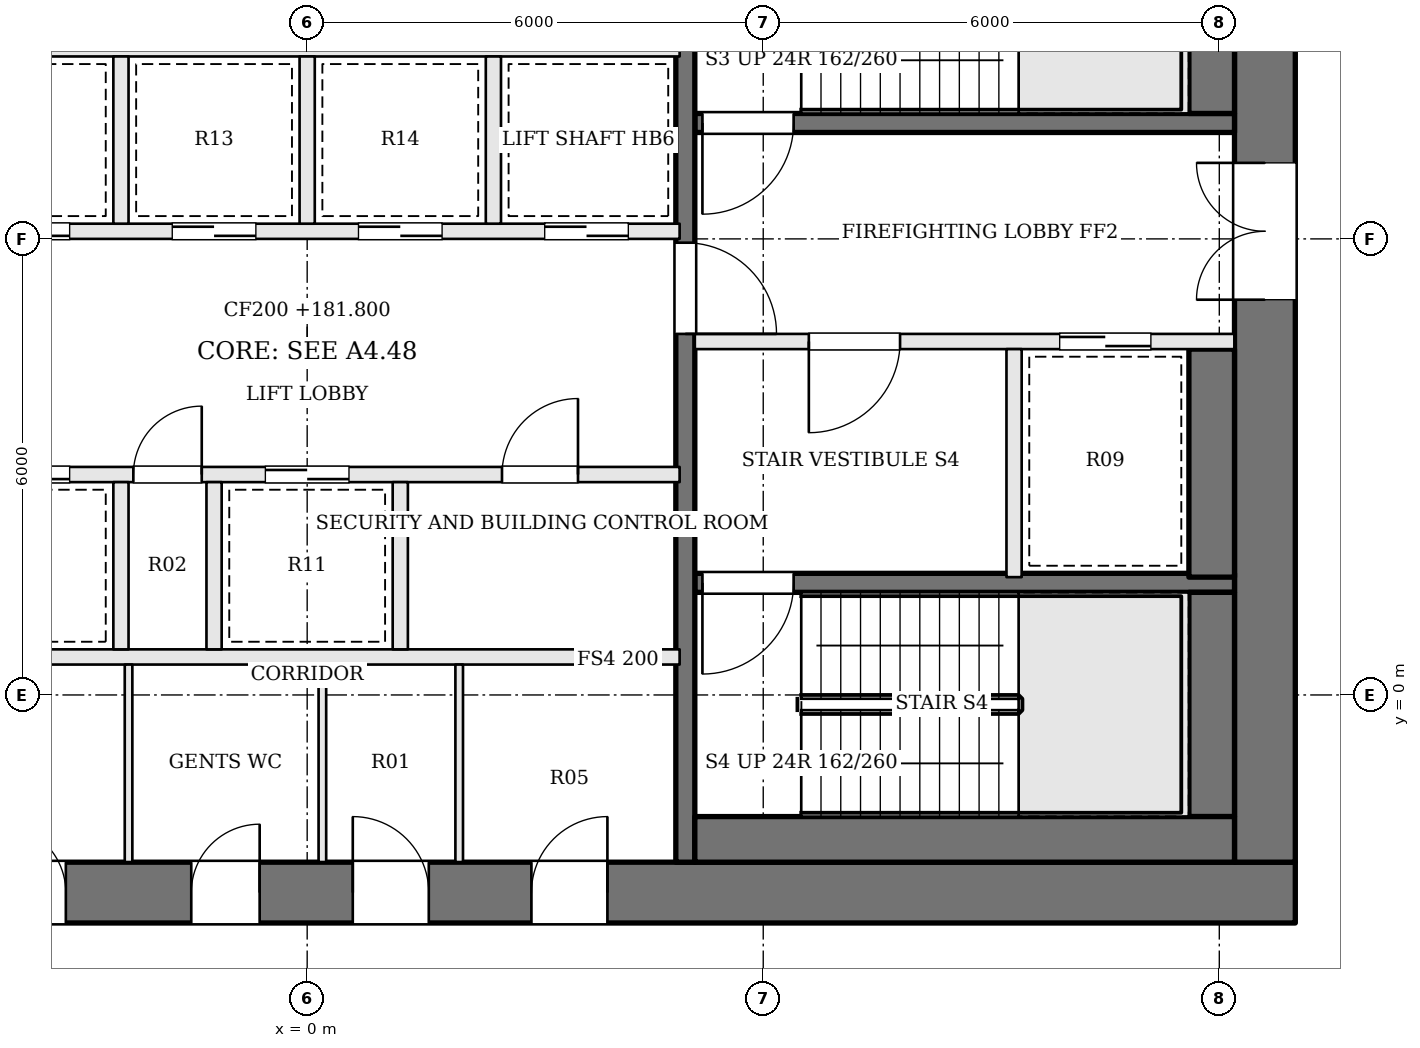
"""IFC4 building model, lengths in metres.
Left out: names, types, materials, properties, quantities, classifications, styles, units other than length and angle.
Written with IfcOpenShell. Run it as: python <this file> out.ifc"""

import sys

from ifc_helpers import new_model, si_unit, direction, frame, frame_2d, origin, place, context, subcontext, project, spatial, rectangle, extrude, element, fill, save


model = new_model("IFC4")
c1 = context("Model", 3, precision=1e-05, world=origin(), true_north=direction((0.0, 1.0)))
c2 = subcontext(c1, "Body", "Model", "MODEL_VIEW")
j1 = project(units=[si_unit("LENGTHUNIT", "METRE"), si_unit("PLANEANGLEUNIT", "RADIAN")], contexts=[c1])
p1 = place(None, origin())
s1 = spatial("IfcSite", under=j1, at=p1, CompositionType="ELEMENT")
p2 = place(p1, origin())
s2 = spatial("IfcBuilding", under=s1, at=p2, CompositionType="ELEMENT")
p3 = place(p2, frame((0.0, 0.0, 181.8)))
s3 = spatial("IfcBuildingStorey", under=s2, at=p3, CompositionType="ELEMENT", Elevation=181.8)
p4 = place(p3, frame((-13.0, -2.6, 0.0), z_axis=(0.0, 0.0, 1.0), x_axis=(1.0, 0.0, 0.0)))
e1 = element("IfcWall", 1, at=p4, inside=s3, PredefinedType="SHEAR", context=c2, shape_type="SweptSolid", body=[
    extrude(rectangle(XDim=26.0, YDim=0.8, at=frame_2d((13.0, 0.0))), origin(), (0.0, 0.0, 1.0), 3.9),
])
p5 = place(p4, frame((8.925, 0.0, 0.0)))
e2 = element("IfcOpeningElement", 2, at=p5, cuts=e1, PredefinedType="OPENING", context=c2, shape_type="SweptSolid", body=[
    extrude(rectangle(XDim=0.9, YDim=2.1, at=frame_2d((0.45, 1.05))), frame((0.0, 0.41, 0.0), z_axis=(0.0, -1.0, 0.0), x_axis=(1.0, 0.0, 0.0)), (0.0, 0.0, 1.0), 0.82),
])
p6 = place(p4, frame((11.475, 0.0, 0.0)))
e3 = element("IfcOpeningElement", 3, at=p6, cuts=e1, PredefinedType="OPENING", context=c2, shape_type="SweptSolid", body=[
    extrude(rectangle(XDim=0.9, YDim=2.1, at=frame_2d((0.45, 1.05))), frame((0.0, 0.41, 0.0), z_axis=(0.0, -1.0, 0.0), x_axis=(1.0, 0.0, 0.0)), (0.0, 0.0, 1.0), 0.82),
])
p7 = place(p4, frame((13.6, 0.0, 0.0)))
e4 = element("IfcOpeningElement", 4, at=p7, cuts=e1, PredefinedType="OPENING", context=c2, shape_type="SweptSolid", body=[
    extrude(rectangle(XDim=1.0, YDim=2.1, at=frame_2d((0.5, 1.05))), frame((0.0, 0.41, 0.0), z_axis=(0.0, -1.0, 0.0), x_axis=(1.0, 0.0, 0.0)), (0.0, 0.0, 1.0), 0.82),
])
p8 = place(p4, frame((15.95, 0.0, 0.0)))
e5 = element("IfcOpeningElement", 5, at=p8, cuts=e1, PredefinedType="OPENING", context=c2, shape_type="SweptSolid", body=[
    extrude(rectangle(XDim=1.0, YDim=2.1, at=frame_2d((0.5, 1.05))), frame((0.0, 0.41, 0.0), z_axis=(0.0, -1.0, 0.0), x_axis=(1.0, 0.0, 0.0)), (0.0, 0.0, 1.0), 0.82),
])
p9 = place(p3, frame((12.6, -2.2, 0.0), z_axis=(0.0, 0.0, 1.0), x_axis=(0.0, 1.0, 0.0)))
e6 = element("IfcWall", 6, at=p9, inside=s3, PredefinedType="SHEAR", context=c2, shape_type="SweptSolid", body=[
    extrude(rectangle(XDim=13.4, YDim=0.8, at=frame_2d((6.7, 0.0))), origin(), (0.0, 0.0, 1.0), 3.9),
])
p10 = place(p9, frame((7.4, 0.0, 0.0)))
e7 = element("IfcOpeningElement", 7, at=p10, cuts=e6, PredefinedType="OPENING", context=c2, shape_type="SweptSolid", body=[
    extrude(rectangle(XDim=1.8, YDim=2.1, at=frame_2d((0.9, 1.05))), frame((0.0, 0.41, 0.0), z_axis=(0.0, -1.0, 0.0), x_axis=(1.0, 0.0, 0.0)), (0.0, 0.0, 1.0), 0.82),
])
p11 = place(p3, frame((12.2, 7.525, 0.0), z_axis=(0.0, 0.0, 1.0), x_axis=(-1.0, 0.0, 0.0)))
e8 = element("IfcWall", 8, at=p11, inside=s3, PredefinedType="SOLIDWALL", context=c2, shape_type="SweptSolid", body=[
    extrude(rectangle(XDim=7.1, YDim=0.25, at=frame_2d((3.55, 0.0))), origin(), (0.0, 0.0, 1.0), 3.7),
])
p12 = place(p11, frame((5.8, 0.0, 0.0)))
e9 = element("IfcOpeningElement", 9, at=p12, cuts=e8, PredefinedType="OPENING", context=c2, shape_type="SweptSolid", body=[
    extrude(rectangle(XDim=1.2, YDim=2.1, at=frame_2d((0.6, 1.05))), frame((0.0, 0.135, 0.0), z_axis=(0.0, -1.0, 0.0), x_axis=(1.0, 0.0, 0.0)), (0.0, 0.0, 1.0), 0.27),
])
p13 = place(p3, frame((12.2, 4.65, 0.0), z_axis=(0.0, 0.0, 1.0), x_axis=(-1.0, 0.0, 0.0)))
e10 = element("IfcWall", 10, at=p13, inside=s3, PredefinedType="SOLIDWALL", context=c2, shape_type="SweptSolid", body=[
    extrude(rectangle(XDim=7.1, YDim=0.2, at=frame_2d((3.55, 0.0))), origin(), (0.0, 0.0, 1.0), 3.7),
])
p14 = place(p13, frame((4.4, 0.0, 0.0)))
e11 = element("IfcOpeningElement", 11, at=p14, cuts=e10, PredefinedType="OPENING", context=c2, shape_type="SweptSolid", body=[
    extrude(rectangle(XDim=1.2, YDim=2.1, at=frame_2d((0.6, 1.05))), frame((0.0, 0.11, 0.0), z_axis=(0.0, -1.0, 0.0), x_axis=(1.0, 0.0, 0.0)), (0.0, 0.0, 1.0), 0.22),
])
p15 = place(p13, frame((1.1, 0.0, 0.0)))
e12 = element("IfcOpeningElement", 12, at=p15, cuts=e10, PredefinedType="OPENING", context=c2, shape_type="SweptSolid", body=[
    extrude(rectangle(XDim=1.2, YDim=2.1, at=frame_2d((0.6, 1.05))), frame((0.0, 0.11, 0.0), z_axis=(0.0, -1.0, 0.0), x_axis=(1.0, 0.0, 0.0)), (0.0, 0.0, 1.0), 0.22),
])
p16 = place(p3, frame((12.2, 1.475, 0.0), z_axis=(0.0, 0.0, 1.0), x_axis=(-1.0, 0.0, 0.0)))
e13 = element("IfcWall", 13, at=p16, inside=s3, PredefinedType="SOLIDWALL", context=c2, shape_type="SweptSolid", body=[
    extrude(rectangle(XDim=7.1, YDim=0.25, at=frame_2d((3.55, 0.0))), origin(), (0.0, 0.0, 1.0), 3.7),
])
p17 = place(p16, frame((5.8, 0.0, 0.0)))
e14 = element("IfcOpeningElement", 14, at=p17, cuts=e13, PredefinedType="OPENING", context=c2, shape_type="SweptSolid", body=[
    extrude(rectangle(XDim=1.2, YDim=2.1, at=frame_2d((0.6, 1.05))), frame((0.0, 0.135, 0.0), z_axis=(0.0, -1.0, 0.0), x_axis=(1.0, 0.0, 0.0)), (0.0, 0.0, 1.0), 0.27),
])
p18 = place(p3, frame((9.3, 4.55, 0.0), z_axis=(0.0, 0.0, 1.0), x_axis=(0.0, -1.0, 0.0)))
e15 = element("IfcWall", 15, at=p18, inside=s3, PredefinedType="SOLIDWALL", context=c2, shape_type="SweptSolid", body=[
    extrude(rectangle(XDim=3.0, YDim=0.2, at=frame_2d((1.5, 0.0))), origin(), (0.0, 0.0, 1.0), 3.7),
])
p19 = place(p3, frame((4.975, 11.2, 0.0), z_axis=(0.0, 0.0, 1.0), x_axis=(0.0, -1.0, 0.0)))
e16 = element("IfcWall", 16, at=p19, inside=s3, PredefinedType="SOLIDWALL", context=c2, shape_type="SweptSolid", body=[
    extrude(rectangle(XDim=13.4, YDim=0.25, at=frame_2d((6.7, 0.0))), origin(), (0.0, 0.0, 1.0), 3.7),
])
p20 = place(p19, frame((5.25, 0.0, 0.0)))
e17 = element("IfcOpeningElement", 17, at=p20, cuts=e16, PredefinedType="OPENING", context=c2, shape_type="SweptSolid", body=[
    extrude(rectangle(XDim=1.2, YDim=2.1, at=frame_2d((0.6, 1.05))), frame((0.0, 0.135, 0.0), z_axis=(0.0, -1.0, 0.0), x_axis=(1.0, 0.0, 0.0)), (0.0, 0.0, 1.0), 0.27),
])
p21 = place(p3, frame((11.9, 10.6, 0.0), z_axis=(0.0, 0.0, 1.0), x_axis=(0.0, -1.0, 0.0)))
e18 = element("IfcWall", 18, at=p21, inside=s3, PredefinedType="SOLIDWALL", context=c2, shape_type="SweptSolid", body=[
    extrude(rectangle(XDim=2.95, YDim=0.6, at=frame_2d((1.475, 0.0))), origin(), (0.0, 0.0, 1.0), 3.7),
])
p22 = place(p3, frame((11.9, 4.55, 0.0), z_axis=(0.0, 0.0, 1.0), x_axis=(0.0, -1.0, 0.0)))
e19 = element("IfcWall", 19, at=p22, inside=s3, PredefinedType="SOLIDWALL", context=c2, shape_type="SweptSolid", body=[
    extrude(rectangle(XDim=3.0, YDim=0.6, at=frame_2d((1.5, 0.0))), origin(), (0.0, 0.0, 1.0), 3.7),
])
p23 = place(p3, frame((11.9, 1.35, 0.0), z_axis=(0.0, 0.0, 1.0), x_axis=(0.0, -1.0, 0.0)))
e20 = element("IfcWall", 20, at=p23, inside=s3, PredefinedType="SOLIDWALL", context=c2, shape_type="SweptSolid", body=[
    extrude(rectangle(XDim=2.95, YDim=0.6, at=frame_2d((1.475, 0.0))), origin(), (0.0, 0.0, 1.0), 3.7),
])
p24 = place(p3, frame((12.2, -1.9, 0.0), z_axis=(0.0, 0.0, 1.0), x_axis=(-1.0, 0.0, 0.0)))
e21 = element("IfcWall", 21, at=p24, inside=s3, PredefinedType="SOLIDWALL", context=c2, shape_type="SweptSolid", body=[
    extrude(rectangle(XDim=7.1, YDim=0.6, at=frame_2d((3.55, 0.0))), origin(), (0.0, 0.0, 1.0), 3.7),
])
p25 = place(p3, frame((-4.9, 0.5, 0.0), z_axis=(0.0, 0.0, 1.0), x_axis=(1.0, 0.0, 0.0)))
e22 = element("IfcWall", 22, at=p25, inside=s3, PredefinedType="SOLIDWALL", context=c2, shape_type="SweptSolid", body=[
    extrude(rectangle(XDim=9.8, YDim=0.2, at=frame_2d((4.9, 0.0))), origin(), (0.0, 0.0, 1.0), 3.7),
])
p26 = place(p3, frame((-4.9, 2.9, 0.0), z_axis=(0.0, 0.0, 1.0), x_axis=(1.0, 0.0, 0.0)))
e23 = element("IfcWall", 23, at=p26, inside=s3, PredefinedType="SOLIDWALL", context=c2, shape_type="SweptSolid", body=[
    extrude(rectangle(XDim=9.8, YDim=0.2, at=frame_2d((4.9, 0.0))), origin(), (0.0, 0.0, 1.0), 3.7),
])
p27 = place(p26, frame((0.675, 0.0, 0.0)))
e24 = element("IfcOpeningElement", 24, at=p27, cuts=e23, PredefinedType="OPENING", context=c2, shape_type="SweptSolid", body=[
    extrude(rectangle(XDim=1.1, YDim=2.1, at=frame_2d((0.55, 1.05))), frame((0.0, 0.11, 0.0), z_axis=(0.0, -1.0, 0.0), x_axis=(1.0, 0.0, 0.0)), (0.0, 0.0, 1.0), 0.22),
])
p28 = place(p26, frame((2.613, 0.0, 0.0)))
e25 = element("IfcOpeningElement", 25, at=p28, cuts=e23, PredefinedType="OPENING", context=c2, shape_type="SweptSolid", body=[
    extrude(rectangle(XDim=0.9, YDim=2.1, at=frame_2d((0.45, 1.05))), frame((0.0, 0.11, 0.0), z_axis=(0.0, -1.0, 0.0), x_axis=(1.0, 0.0, 0.0)), (0.0, 0.0, 1.0), 0.22),
])
p29 = place(p26, frame((4.35, 0.0, 0.0)))
e26 = element("IfcOpeningElement", 26, at=p29, cuts=e23, PredefinedType="OPENING", context=c2, shape_type="SweptSolid", body=[
    extrude(rectangle(XDim=1.1, YDim=2.1, at=frame_2d((0.55, 1.05))), frame((0.0, 0.11, 0.0), z_axis=(0.0, -1.0, 0.0), x_axis=(1.0, 0.0, 0.0)), (0.0, 0.0, 1.0), 0.22),
])
p30 = place(p26, frame((7.463, 0.0, 0.0)))
e27 = element("IfcOpeningElement", 27, at=p30, cuts=e23, PredefinedType="OPENING", context=c2, shape_type="SweptSolid", body=[
    extrude(rectangle(XDim=1.0, YDim=2.1, at=frame_2d((0.5, 1.05))), frame((0.0, 0.11, 0.0), z_axis=(0.0, -1.0, 0.0), x_axis=(1.0, 0.0, 0.0)), (0.0, 0.0, 1.0), 0.22),
])
p31 = place(p3, frame((-4.9, 6.1, 0.0), z_axis=(0.0, 0.0, 1.0), x_axis=(1.0, 0.0, 0.0)))
e28 = element("IfcWall", 28, at=p31, inside=s3, PredefinedType="SOLIDWALL", context=c2, shape_type="SweptSolid", body=[
    extrude(rectangle(XDim=9.8, YDim=0.2, at=frame_2d((4.9, 0.0))), origin(), (0.0, 0.0, 1.0), 3.7),
])
p32 = place(p31, frame((0.675, 0.0, 0.0)))
e29 = element("IfcOpeningElement", 29, at=p32, cuts=e28, PredefinedType="OPENING", context=c2, shape_type="SweptSolid", body=[
    extrude(rectangle(XDim=1.1, YDim=2.1, at=frame_2d((0.55, 1.05))), frame((0.0, 0.11, 0.0), z_axis=(0.0, -1.0, 0.0), x_axis=(1.0, 0.0, 0.0)), (0.0, 0.0, 1.0), 0.22),
])
p33 = place(p31, frame((3.125, 0.0, 0.0)))
e30 = element("IfcOpeningElement", 30, at=p33, cuts=e28, PredefinedType="OPENING", context=c2, shape_type="SweptSolid", body=[
    extrude(rectangle(XDim=1.1, YDim=2.1, at=frame_2d((0.55, 1.05))), frame((0.0, 0.11, 0.0), z_axis=(0.0, -1.0, 0.0), x_axis=(1.0, 0.0, 0.0)), (0.0, 0.0, 1.0), 0.22),
])
p34 = place(p31, frame((5.575, 0.0, 0.0)))
e31 = element("IfcOpeningElement", 31, at=p34, cuts=e28, PredefinedType="OPENING", context=c2, shape_type="SweptSolid", body=[
    extrude(rectangle(XDim=1.1, YDim=2.1, at=frame_2d((0.55, 1.05))), frame((0.0, 0.11, 0.0), z_axis=(0.0, -1.0, 0.0), x_axis=(1.0, 0.0, 0.0)), (0.0, 0.0, 1.0), 0.22),
])
p35 = place(p31, frame((8.025, 0.0, 0.0)))
e32 = element("IfcOpeningElement", 32, at=p35, cuts=e28, PredefinedType="OPENING", context=c2, shape_type="SweptSolid", body=[
    extrude(rectangle(XDim=1.1, YDim=2.1, at=frame_2d((0.55, 1.05))), frame((0.0, 0.11, 0.0), z_axis=(0.0, -1.0, 0.0), x_axis=(1.0, 0.0, 0.0)), (0.0, 0.0, 1.0), 0.22),
])
p36 = place(p3, frame((-4.9, 8.5, 0.0), z_axis=(0.0, 0.0, 1.0), x_axis=(1.0, 0.0, 0.0)))
e33 = element("IfcWall", 33, at=p36, inside=s3, PredefinedType="SOLIDWALL", context=c2, shape_type="SweptSolid", body=[
    extrude(rectangle(XDim=9.8, YDim=0.2, at=frame_2d((4.9, 0.0))), origin(), (0.0, 0.0, 1.0), 3.7),
])
for number, where, z_axis, x_axis in (
    (34, (-2.45, 0.6, 0.0), (0.0, 0.0, 1.0), (0.0, 1.0, 0.0)),
    (35, (-1.225, 0.6, 0.0), (0.0, 0.0, 1.0), (0.0, 1.0, 0.0)),
    (36, (1.225, 0.6, 0.0), (0.0, 0.0, 1.0), (0.0, 1.0, 0.0)),
    (37, (-2.45, 6.2, 0.0), (0.0, 0.0, 1.0), (0.0, 1.0, 0.0)),
    (38, (0.0, 6.2, 0.0), (0.0, 0.0, 1.0), (0.0, 1.0, 0.0)),
    (39, (2.45, 6.2, 0.0), (0.0, 0.0, 1.0), (0.0, 1.0, 0.0)),
):
    element("IfcWall", number, at=place(p3, frame(where, z_axis=z_axis, x_axis=x_axis)), inside=s3, PredefinedType="SOLIDWALL", context=c2, shape_type="SweptSolid", body=[
        extrude(rectangle(XDim=2.2, YDim=0.2, at=frame_2d((1.1, 0.0))), origin(), (0.0, 0.0, 1.0), 3.7),
    ])
for number, where, z_axis, x_axis in (
    (40, (-2.35, -2.2, 0.0), (0.0, 0.0, 1.0), (0.0, 1.0, 0.0)),
    (41, (0.2, -2.2, 0.0), (0.0, 0.0, 1.0), (0.0, 1.0, 0.0)),
    (42, (2.0, -2.2, 0.0), (0.0, 0.0, 1.0), (0.0, 1.0, 0.0)),
):
    element("IfcWall", number, at=place(p3, frame(where, z_axis=z_axis, x_axis=x_axis)), inside=s3, PredefinedType="PARTITIONING", context=c2, shape_type="SweptSolid", body=[
        extrude(rectangle(XDim=2.6, YDim=0.1, at=frame_2d((1.3, 0.0))), origin(), (0.0, 0.0, 1.0), 3.7),
    ])
p37 = place(p10, origin())
e43 = element("IfcDoor", 43, at=p37, inside=s3, OperationType="DOUBLE_DOOR_SINGLE_SWING", PredefinedType="DOOR", context=c2, shape_type="SweptSolid", body=[
    extrude(rectangle(XDim=1.8, YDim=2.1, at=frame_2d((0.9, 1.05))), frame((0.0, 0.025, 0.0), z_axis=(0.0, -1.0, 0.0), x_axis=(1.0, 0.0, 0.0)), (0.0, 0.0, 1.0), 0.05),
])
fill(e7, e43)
p38 = place(p20, origin())
e44 = element("IfcDoor", 44, at=p38, inside=s3, OperationType="SINGLE_SWING_RIGHT", PredefinedType="DOOR", context=c2, shape_type="SweptSolid", body=[
    extrude(rectangle(XDim=1.2, YDim=2.1, at=frame_2d((0.6, 1.05))), frame((0.0, 0.025, 0.0), z_axis=(0.0, -1.0, 0.0), x_axis=(1.0, 0.0, 0.0)), (0.0, 0.0, 1.0), 0.05),
])
fill(e17, e44)
p39 = place(p14, origin())
e45 = element("IfcDoor", 45, at=p39, inside=s3, OperationType="SINGLE_SWING_RIGHT", PredefinedType="DOOR", context=c2, shape_type="SweptSolid", body=[
    extrude(rectangle(XDim=1.2, YDim=2.1, at=frame_2d((0.6, 1.05))), frame((0.0, 0.025, 0.0), z_axis=(0.0, -1.0, 0.0), x_axis=(1.0, 0.0, 0.0)), (0.0, 0.0, 1.0), 0.05),
])
fill(e11, e45)
p40 = place(p12, origin())
e46 = element("IfcDoor", 46, at=p40, inside=s3, OperationType="SINGLE_SWING_RIGHT", PredefinedType="DOOR", context=c2, shape_type="SweptSolid", body=[
    extrude(rectangle(XDim=1.2, YDim=2.1, at=frame_2d((0.6, 1.05))), frame((0.0, 0.025, 0.0), z_axis=(0.0, -1.0, 0.0), x_axis=(1.0, 0.0, 0.0)), (0.0, 0.0, 1.0), 0.05),
])
fill(e9, e46)
p41 = place(p17, origin())
e47 = element("IfcDoor", 47, at=p41, inside=s3, OperationType="SINGLE_SWING_RIGHT", PredefinedType="DOOR", context=c2, shape_type="SweptSolid", body=[
    extrude(rectangle(XDim=1.2, YDim=2.1, at=frame_2d((0.6, 1.05))), frame((0.0, 0.025, 0.0), z_axis=(0.0, -1.0, 0.0), x_axis=(1.0, 0.0, 0.0)), (0.0, 0.0, 1.0), 0.05),
])
fill(e14, e47)
p42 = place(p15, origin())
e48 = element("IfcDoor", 48, at=p42, inside=s3, OperationType="SLIDING_TO_RIGHT", PredefinedType="DOOR", context=c2, shape_type="SweptSolid", body=[
    extrude(rectangle(XDim=1.2, YDim=2.1, at=frame_2d((0.6, 1.05))), frame((0.0, 0.025, 0.0), z_axis=(0.0, -1.0, 0.0), x_axis=(1.0, 0.0, 0.0)), (0.0, 0.0, 1.0), 0.05),
])
fill(e12, e48)
p43 = place(p27, origin())
e49 = element("IfcDoor", 49, at=p43, inside=s3, OperationType="SLIDING_TO_RIGHT", PredefinedType="DOOR", context=c2, shape_type="SweptSolid", body=[
    extrude(rectangle(XDim=1.1, YDim=2.1, at=frame_2d((0.55, 1.05))), frame((0.0, 0.025, 0.0), z_axis=(0.0, -1.0, 0.0), x_axis=(1.0, 0.0, 0.0)), (0.0, 0.0, 1.0), 0.05),
])
fill(e24, e49)
p44 = place(p28, origin())
e50 = element("IfcDoor", 50, at=p44, inside=s3, OperationType="SINGLE_SWING_RIGHT", PredefinedType="DOOR", context=c2, shape_type="SweptSolid", body=[
    extrude(rectangle(XDim=0.9, YDim=2.1, at=frame_2d((0.45, 1.05))), frame((0.0, 0.025, 0.0), z_axis=(0.0, -1.0, 0.0), x_axis=(1.0, 0.0, 0.0)), (0.0, 0.0, 1.0), 0.05),
])
fill(e25, e50)
p45 = place(p29, origin())
e51 = element("IfcDoor", 51, at=p45, inside=s3, OperationType="SLIDING_TO_LEFT", PredefinedType="DOOR", context=c2, shape_type="SweptSolid", body=[
    extrude(rectangle(XDim=1.1, YDim=2.1, at=frame_2d((0.55, 1.05))), frame((0.0, 0.025, 0.0), z_axis=(0.0, -1.0, 0.0), x_axis=(1.0, 0.0, 0.0)), (0.0, 0.0, 1.0), 0.05),
])
fill(e26, e51)
p46 = place(p30, origin())
e52 = element("IfcDoor", 52, at=p46, inside=s3, OperationType="SINGLE_SWING_RIGHT", PredefinedType="DOOR", context=c2, shape_type="SweptSolid", body=[
    extrude(rectangle(XDim=1.0, YDim=2.1, at=frame_2d((0.5, 1.05))), frame((0.0, 0.025, 0.0), z_axis=(0.0, -1.0, 0.0), x_axis=(1.0, 0.0, 0.0)), (0.0, 0.0, 1.0), 0.05),
])
fill(e27, e52)
p47 = place(p32, origin())
e53 = element("IfcDoor", 53, at=p47, inside=s3, OperationType="SLIDING_TO_RIGHT", PredefinedType="DOOR", context=c2, shape_type="SweptSolid", body=[
    extrude(rectangle(XDim=1.1, YDim=2.1, at=frame_2d((0.55, 1.05))), frame((0.0, 0.025, 0.0), z_axis=(0.0, -1.0, 0.0), x_axis=(1.0, 0.0, 0.0)), (0.0, 0.0, 1.0), 0.05),
])
fill(e29, e53)
p48 = place(p33, origin())
e54 = element("IfcDoor", 54, at=p48, inside=s3, OperationType="SLIDING_TO_LEFT", PredefinedType="DOOR", context=c2, shape_type="SweptSolid", body=[
    extrude(rectangle(XDim=1.1, YDim=2.1, at=frame_2d((0.55, 1.05))), frame((0.0, 0.025, 0.0), z_axis=(0.0, -1.0, 0.0), x_axis=(1.0, 0.0, 0.0)), (0.0, 0.0, 1.0), 0.05),
])
fill(e30, e54)
p49 = place(p34, origin())
e55 = element("IfcDoor", 55, at=p49, inside=s3, OperationType="SLIDING_TO_RIGHT", PredefinedType="DOOR", context=c2, shape_type="SweptSolid", body=[
    extrude(rectangle(XDim=1.1, YDim=2.1, at=frame_2d((0.55, 1.05))), frame((0.0, 0.025, 0.0), z_axis=(0.0, -1.0, 0.0), x_axis=(1.0, 0.0, 0.0)), (0.0, 0.0, 1.0), 0.05),
])
fill(e31, e55)
p50 = place(p35, origin())
e56 = element("IfcDoor", 56, at=p50, inside=s3, OperationType="SLIDING_TO_LEFT", PredefinedType="DOOR", context=c2, shape_type="SweptSolid", body=[
    extrude(rectangle(XDim=1.1, YDim=2.1, at=frame_2d((0.55, 1.05))), frame((0.0, 0.025, 0.0), z_axis=(0.0, -1.0, 0.0), x_axis=(1.0, 0.0, 0.0)), (0.0, 0.0, 1.0), 0.05),
])
fill(e32, e56)
p51 = place(p5, origin())
e57 = element("IfcDoor", 57, at=p51, inside=s3, OperationType="SINGLE_SWING_LEFT", PredefinedType="DOOR", context=c2, shape_type="SweptSolid", body=[
    extrude(rectangle(XDim=0.9, YDim=2.1, at=frame_2d((0.45, 1.05))), frame((0.0, 0.025, 0.0), z_axis=(0.0, -1.0, 0.0), x_axis=(1.0, 0.0, 0.0)), (0.0, 0.0, 1.0), 0.05),
])
fill(e2, e57)
p52 = place(p6, origin())
e58 = element("IfcDoor", 58, at=p52, inside=s3, OperationType="SINGLE_SWING_RIGHT", PredefinedType="DOOR", context=c2, shape_type="SweptSolid", body=[
    extrude(rectangle(XDim=0.9, YDim=2.1, at=frame_2d((0.45, 1.05))), frame((0.0, 0.025, 0.0), z_axis=(0.0, -1.0, 0.0), x_axis=(1.0, 0.0, 0.0)), (0.0, 0.0, 1.0), 0.05),
])
fill(e3, e58)
p53 = place(p7, origin())
e59 = element("IfcDoor", 59, at=p53, inside=s3, OperationType="SINGLE_SWING_LEFT", PredefinedType="DOOR", context=c2, shape_type="SweptSolid", body=[
    extrude(rectangle(XDim=1.0, YDim=2.1, at=frame_2d((0.5, 1.05))), frame((0.0, 0.025, 0.0), z_axis=(0.0, -1.0, 0.0), x_axis=(1.0, 0.0, 0.0)), (0.0, 0.0, 1.0), 0.05),
])
fill(e4, e59)
p54 = place(p8, origin())
e60 = element("IfcDoor", 60, at=p54, inside=s3, OperationType="SINGLE_SWING_RIGHT", PredefinedType="DOOR", context=c2, shape_type="SweptSolid", body=[
    extrude(rectangle(XDim=1.0, YDim=2.1, at=frame_2d((0.5, 1.05))), frame((0.0, 0.025, 0.0), z_axis=(0.0, -1.0, 0.0), x_axis=(1.0, 0.0, 0.0)), (0.0, 0.0, 1.0), 0.05),
])
fill(e5, e60)
save(model, sys.argv[1])
